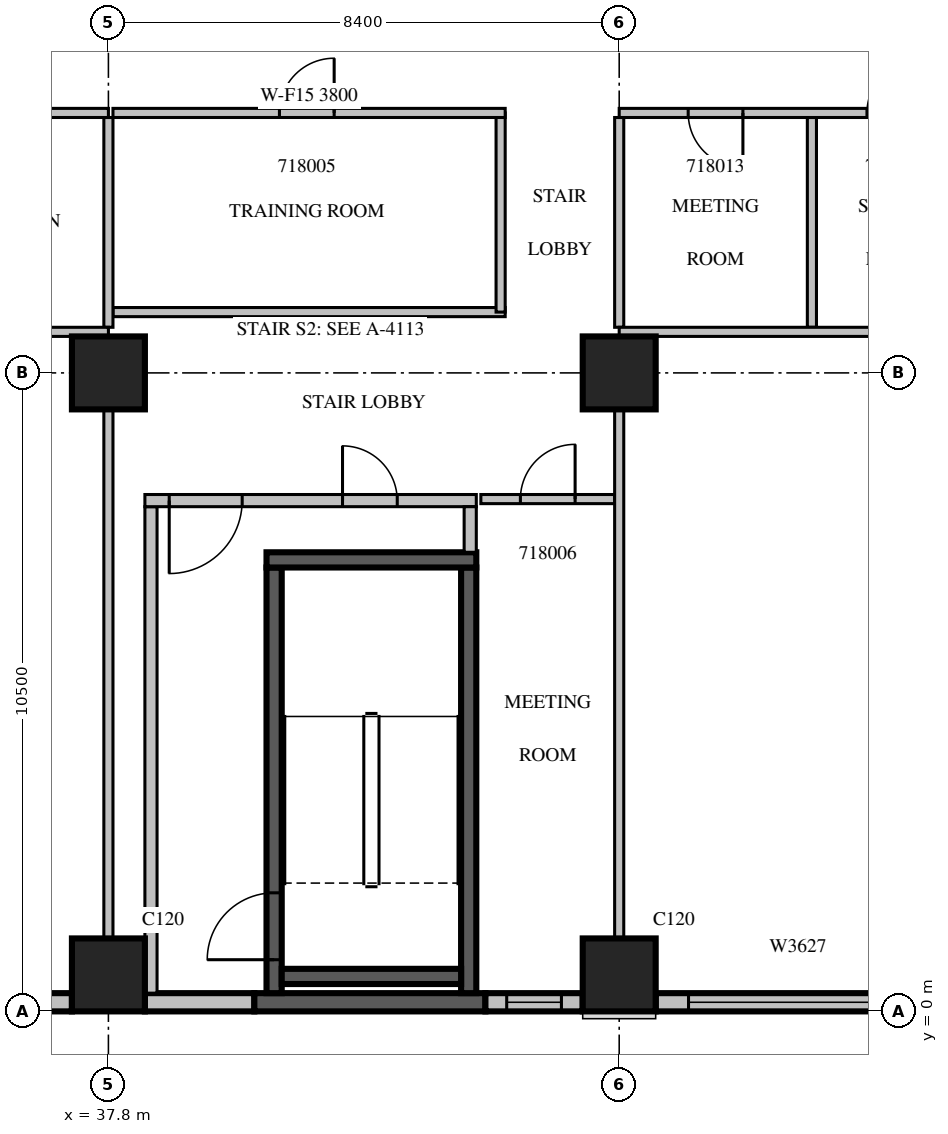
"""IFC4 building model, lengths in metres.
Left out: names, types, materials, properties, quantities, classifications, styles, units other than length and angle.
Written with IfcOpenShell. Run it as: python <this file> out.ifc"""

import sys

from ifc_helpers import new_model, si_unit, direction, frame, frame_2d, origin, origin_2d, place, context, subcontext, project, spatial, rectangle, extrude, source, transform, mapped, element, fill, save


model = new_model("IFC4")
c1 = context("Model", 3, precision=1e-05, world=origin(), true_north=direction((0.0, 1.0)))
c2 = subcontext(c1, "Body", "Model", "MODEL_VIEW")
j1 = project(units=[si_unit("LENGTHUNIT", "METRE"), si_unit("PLANEANGLEUNIT", "RADIAN")], contexts=[c1])
p1 = place(None, origin())
s1 = spatial("IfcSite", under=j1, at=p1, CompositionType="ELEMENT")
p2 = place(p1, origin())
s2 = spatial("IfcBuilding", under=s1, at=p2, CompositionType="ELEMENT")
p3 = place(p2, frame((0.0, 0.0, 86.7)))
s3 = spatial("IfcBuildingStorey", under=s2, at=p3, CompositionType="ELEMENT", Elevation=86.7)
m1 = source(origin(), c2, "Body", "SweptSolid", [
    extrude(rectangle(XDim=1.2, YDim=1.2, at=origin_2d()), origin(), (0.0, 0.0, 1.0), 4.2),
])
for number, where, z_axis, x_axis in (
    (1, (37.8, 0.6, 0.0), (0.0, 0.0, 1.0), (1.0, 0.0, 0.0)),
    (2, (46.2, 0.6, 0.0), (0.0, 0.0, 1.0), (1.0, 0.0, 0.0)),
    (3, (37.8, 10.5, 0.0), (0.0, 0.0, 1.0), (1.0, 0.0, 0.0)),
    (4, (46.2, 10.5, 0.0), (0.0, 0.0, 1.0), (1.0, 0.0, 0.0)),
):
    element("IfcColumn", number, at=place(p3, frame(where, z_axis=z_axis, x_axis=x_axis)), inside=s3, PredefinedType="COLUMN", context=c2, shape_type="MappedRepresentation", body=[
        mapped(m1, transform((0.0, 0.0, 0.0), scale=1.0)),
    ])
m2 = source(origin(), c2, "Body", "SweptSolid", [
    extrude(rectangle(XDim=7.2, YDim=0.3, at=frame_2d((3.6, 0.0))), origin(), (0.0, 0.0, 1.0), 3.8),
])
p4 = place(p3, frame((30.0, 0.15, 0.0), z_axis=(0.0, 0.0, 1.0), x_axis=(1.0, 0.0, 0.0)))
e5 = element("IfcWall", 5, at=p4, inside=s3, PredefinedType="STANDARD", context=c2, shape_type="MappedRepresentation", body=[
    mapped(m2, transform((0.0, 0.0, 0.0), scale=1.0)),
])
m3 = source(origin(), c2, "Body", "SweptSolid", [
    extrude(rectangle(XDim=2.4, YDim=2.7, at=frame_2d((1.2, 1.35))), frame((0.0, 0.16, 0.0), z_axis=(0.0, -1.0, 0.0), x_axis=(1.0, 0.0, 0.0)), (0.0, 0.0, 1.0), 0.32),
])
p5 = place(p4, frame((2.5, 0.0, 0.6)))
e6 = element("IfcOpeningElement", 6, at=p5, cuts=e5, PredefinedType="OPENING", context=c2, shape_type="MappedRepresentation", body=[
    mapped(m3, transform((0.0, 0.0, 0.0), scale=1.0)),
])
m4 = source(origin(), c2, "Body", "SweptSolid", [
    extrude(rectangle(XDim=1.8, YDim=0.3, at=frame_2d((0.9, 0.0))), origin(), (0.0, 0.0, 1.0), 3.8),
])
p6 = place(p3, frame((38.4, 0.15, 0.0), z_axis=(0.0, 0.0, 1.0), x_axis=(1.0, 0.0, 0.0)))
e7 = element("IfcWall", 7, at=p6, inside=s3, PredefinedType="STANDARD", context=c2, shape_type="MappedRepresentation", body=[
    mapped(m4, transform((0.0, 0.0, 0.0), scale=1.0)),
])
m5 = source(origin(), c2, "Body", "SweptSolid", [
    extrude(rectangle(XDim=3.8, YDim=0.3, at=frame_2d((1.9, 0.0))), origin(), (0.0, 0.0, 1.0), 3.8),
])
p7 = place(p3, frame((40.2, 0.15, 0.0), z_axis=(0.0, 0.0, 1.0), x_axis=(1.0, 0.0, 0.0)))
e8 = element("IfcWall", 8, at=p7, inside=s3, PredefinedType="SOLIDWALL", context=c2, shape_type="MappedRepresentation", body=[
    mapped(m5, transform((0.0, 0.0, 0.0), scale=1.0)),
])
m6 = source(origin(), c2, "Body", "SweptSolid", [
    extrude(rectangle(XDim=1.6, YDim=0.3, at=frame_2d((0.8, 0.0))), origin(), (0.0, 0.0, 1.0), 3.8),
])
p8 = place(p3, frame((44.0, 0.15, 0.0), z_axis=(0.0, 0.0, 1.0), x_axis=(1.0, 0.0, 0.0)))
e9 = element("IfcWall", 9, at=p8, inside=s3, PredefinedType="STANDARD", context=c2, shape_type="MappedRepresentation", body=[
    mapped(m6, transform((0.0, 0.0, 0.0), scale=1.0)),
])
m7 = source(origin(), c2, "Body", "SweptSolid", [
    extrude(rectangle(XDim=0.9, YDim=2.7, at=frame_2d((0.45, 1.35))), frame((0.0, 0.16, 0.0), z_axis=(0.0, -1.0, 0.0), x_axis=(1.0, 0.0, 0.0)), (0.0, 0.0, 1.0), 0.32),
])
p9 = place(p8, frame((0.35, 0.0, 0.6)))
e10 = element("IfcOpeningElement", 10, at=p9, cuts=e9, PredefinedType="OPENING", context=c2, shape_type="MappedRepresentation", body=[
    mapped(m7, transform((0.0, 0.0, 0.0), scale=1.0)),
])
m8 = source(origin(), c2, "Body", "SweptSolid", [
    extrude(rectangle(XDim=4.68, YDim=0.3, at=frame_2d((2.34, 0.0))), origin(), (0.0, 0.0, 1.0), 3.8),
])
p10 = place(p3, frame((46.8, 0.15, 0.0), z_axis=(0.0, 0.0, 1.0), x_axis=(1.0, 0.0, 0.0)))
e11 = element("IfcWall", 11, at=p10, inside=s3, PredefinedType="STANDARD", context=c2, shape_type="MappedRepresentation", body=[
    mapped(m8, transform((0.0, 0.0, 0.0), scale=1.0)),
])
m9 = source(origin(), c2, "Body", "SweptSolid", [
    extrude(rectangle(XDim=3.6, YDim=2.7, at=frame_2d((1.8, 1.35))), frame((0.0, 0.16, 0.0), z_axis=(0.0, -1.0, 0.0), x_axis=(1.0, 0.0, 0.0)), (0.0, 0.0, 1.0), 0.32),
])
p11 = place(p10, frame((0.54, 0.0, 0.6)))
e12 = element("IfcOpeningElement", 12, at=p11, cuts=e11, PredefinedType="OPENING", context=c2, shape_type="MappedRepresentation", body=[
    mapped(m9, transform((0.0, 0.0, 0.0), scale=1.0)),
])
m10 = source(origin(), c2, "Body", "SweptSolid", [
    extrude(rectangle(XDim=7.0, YDim=0.25, at=frame_2d((3.5, 0.0))), origin(), (0.0, 0.0, 1.0), 3.8),
])
p12 = place(p3, frame((40.525, 0.3, 0.0), z_axis=(0.0, 0.0, 1.0), x_axis=(0.0, 1.0, 0.0)))
e13 = element("IfcWall", 13, at=p12, inside=s3, PredefinedType="SOLIDWALL", context=c2, shape_type="MappedRepresentation", body=[
    mapped(m10, transform((0.0, 0.0, 0.0), scale=1.0)),
])
m11 = source(origin(), c2, "Body", "SweptSolid", [
    extrude(rectangle(XDim=1.1, YDim=2.1, at=frame_2d((0.55, 1.05))), frame((0.0, 0.135, 0.0), z_axis=(0.0, -1.0, 0.0), x_axis=(1.0, 0.0, 0.0)), (0.0, 0.0, 1.0), 0.27),
])
p13 = place(p12, frame((0.55, 0.0, 0.0)))
e14 = element("IfcOpeningElement", 14, at=p13, cuts=e13, PredefinedType="OPENING", context=c2, shape_type="MappedRepresentation", body=[
    mapped(m11, transform((0.0, 0.0, 0.0), scale=1.0)),
])
p14 = place(p3, frame((43.725, 0.3, 0.0), z_axis=(0.0, 0.0, 1.0), x_axis=(0.0, 1.0, 0.0)))
e15 = element("IfcWall", 15, at=p14, inside=s3, PredefinedType="SOLIDWALL", context=c2, shape_type="MappedRepresentation", body=[
    mapped(m10, transform((0.0, 0.0, 0.0), scale=1.0)),
])
m12 = source(origin(), c2, "Body", "SweptSolid", [
    extrude(rectangle(XDim=3.45, YDim=0.25, at=frame_2d((1.725, 0.0))), origin(), (0.0, 0.0, 1.0), 3.8),
])
p15 = place(p3, frame((40.4, 7.425, 0.0), z_axis=(0.0, 0.0, 1.0), x_axis=(1.0, 0.0, 0.0)))
e16 = element("IfcWall", 16, at=p15, inside=s3, PredefinedType="SOLIDWALL", context=c2, shape_type="MappedRepresentation", body=[
    mapped(m12, transform((0.0, 0.0, 0.0), scale=1.0)),
])
m13 = source(origin(), c2, "Body", "SweptSolid", [
    extrude(rectangle(XDim=2.95, YDim=0.25, at=frame_2d((1.475, 0.0))), origin(), (0.0, 0.0, 1.0), 3.8),
])
p16 = place(p3, frame((40.65, 0.575, 0.0), z_axis=(0.0, 0.0, 1.0), x_axis=(1.0, 0.0, 0.0)))
e17 = element("IfcWall", 17, at=p16, inside=s3, PredefinedType="SOLIDWALL", context=c2, shape_type="MappedRepresentation", body=[
    mapped(m13, transform((0.0, 0.0, 0.0), scale=1.0)),
])
m14 = source(origin(), c2, "Body", "SweptSolid", [
    extrude(rectangle(XDim=8.0, YDim=0.2, at=frame_2d((4.0, 0.0))), origin(), (0.0, 0.0, 1.0), 3.8),
])
p17 = place(p3, frame((38.5, 0.3, 0.0), z_axis=(0.0, 0.0, 1.0), x_axis=(0.0, 1.0, 0.0)))
e18 = element("IfcWall", 18, at=p17, inside=s3, PredefinedType="PARTITIONING", context=c2, shape_type="MappedRepresentation", body=[
    mapped(m14, transform((0.0, 0.0, 0.0), scale=1.0)),
])
m15 = source(origin(), c2, "Body", "SweptSolid", [
    extrude(rectangle(XDim=5.45, YDim=0.2, at=frame_2d((2.725, 0.0))), origin(), (0.0, 0.0, 1.0), 3.8),
])
p18 = place(p3, frame((38.4, 8.4, 0.0), z_axis=(0.0, 0.0, 1.0), x_axis=(1.0, 0.0, 0.0)))
e19 = element("IfcWall", 19, at=p18, inside=s3, PredefinedType="PARTITIONING", context=c2, shape_type="MappedRepresentation", body=[
    mapped(m15, transform((0.0, 0.0, 0.0), scale=1.0)),
])
m16 = source(origin(), c2, "Body", "SweptSolid", [
    extrude(rectangle(XDim=1.2, YDim=2.1, at=frame_2d((0.6, 1.05))), frame((0.0, 0.11, 0.0), z_axis=(0.0, -1.0, 0.0), x_axis=(1.0, 0.0, 0.0)), (0.0, 0.0, 1.0), 0.22),
])
p19 = place(p18, frame((0.4, 0.0, 0.0)))
e20 = element("IfcOpeningElement", 20, at=p19, cuts=e19, PredefinedType="OPENING", context=c2, shape_type="MappedRepresentation", body=[
    mapped(m16, transform((0.0, 0.0, 0.0), scale=1.0)),
])
m17 = source(origin(), c2, "Body", "SweptSolid", [
    extrude(rectangle(XDim=0.9, YDim=2.1, at=frame_2d((0.45, 1.05))), frame((0.0, 0.11, 0.0), z_axis=(0.0, -1.0, 0.0), x_axis=(1.0, 0.0, 0.0)), (0.0, 0.0, 1.0), 0.22),
])
p20 = place(p18, frame((3.25, 0.0, 0.0)))
e21 = element("IfcOpeningElement", 21, at=p20, cuts=e19, PredefinedType="OPENING", context=c2, shape_type="MappedRepresentation", body=[
    mapped(m17, transform((0.0, 0.0, 0.0), scale=1.0)),
])
m18 = source(origin(), c2, "Body", "SweptSolid", [
    extrude(rectangle(XDim=0.75, YDim=0.2, at=frame_2d((0.375, 0.0))), origin(), (0.0, 0.0, 1.0), 3.8),
])
p21 = place(p3, frame((43.75, 7.55, 0.0), z_axis=(0.0, 0.0, 1.0), x_axis=(0.0, 1.0, 0.0)))
e22 = element("IfcWall", 22, at=p21, inside=s3, PredefinedType="PARTITIONING", context=c2, shape_type="MappedRepresentation", body=[
    mapped(m18, transform((0.0, 0.0, 0.0), scale=1.0)),
])
m19 = source(origin(), c2, "Body", "SweptSolid", [
    extrude(rectangle(XDim=6.45, YDim=0.15, at=frame_2d((3.225, 0.0))), origin(), (0.0, 0.0, 1.0), 3.8),
])
p22 = place(p3, frame((37.875, 11.5, 0.0), z_axis=(0.0, 0.0, 1.0), x_axis=(1.0, 0.0, 0.0)))
e23 = element("IfcWall", 23, at=p22, inside=s3, PredefinedType="PARTITIONING", context=c2, shape_type="MappedRepresentation", body=[
    mapped(m19, transform((0.0, 0.0, 0.0), scale=1.0)),
])
m20 = source(origin(), c2, "Body", "SweptSolid", [
    extrude(rectangle(XDim=3.275, YDim=0.15, at=frame_2d((1.637, 0.0))), origin(), (0.0, 0.0, 1.0), 3.8),
])
p23 = place(p3, frame((44.25, 11.5, 0.0), z_axis=(0.0, 0.0, 1.0), x_axis=(0.0, 1.0, 0.0)))
e24 = element("IfcWall", 24, at=p23, inside=s3, PredefinedType="PARTITIONING", context=c2, shape_type="MappedRepresentation", body=[
    mapped(m20, transform((0.0, 0.0, 0.0), scale=1.0)),
])
p24 = place(p3, frame((44.325, 14.775, 0.0), z_axis=(0.0, 0.0, 1.0), x_axis=(-1.0, 0.0, 0.0)))
e25 = element("IfcWall", 25, at=p24, inside=s3, PredefinedType="PARTITIONING", context=c2, shape_type="MappedRepresentation", body=[
    mapped(m19, transform((0.0, 0.0, 0.0), scale=1.0)),
])
m21 = source(origin(), c2, "Body", "SweptSolid", [
    extrude(rectangle(XDim=0.9, YDim=2.1, at=frame_2d((0.45, 1.05))), frame((0.0, 0.085, 0.0), z_axis=(0.0, -1.0, 0.0), x_axis=(1.0, 0.0, 0.0)), (0.0, 0.0, 1.0), 0.17),
])
p25 = place(p24, frame((2.812, 0.0, 0.0)))
e26 = element("IfcOpeningElement", 26, at=p25, cuts=e25, PredefinedType="OPENING", context=c2, shape_type="MappedRepresentation", body=[
    mapped(m21, transform((0.0, 0.0, 0.0), scale=1.0)),
])
m22 = source(origin(), c2, "Body", "SweptSolid", [
    extrude(rectangle(XDim=2.2, YDim=0.15, at=frame_2d((1.1, 0.0))), origin(), (0.0, 0.0, 1.0), 3.8),
])
p26 = place(p3, frame((46.125, 8.425, 0.0), z_axis=(0.0, 0.0, 1.0), x_axis=(-1.0, 0.0, 0.0)))
e27 = element("IfcWall", 27, at=p26, inside=s3, PredefinedType="PARTITIONING", context=c2, shape_type="MappedRepresentation", body=[
    mapped(m22, transform((0.0, 0.0, 0.0), scale=1.0)),
])
p27 = place(p26, frame((0.65, 0.0, 0.0)))
e28 = element("IfcOpeningElement", 28, at=p27, cuts=e27, PredefinedType="OPENING", context=c2, shape_type="MappedRepresentation", body=[
    mapped(m21, transform((0.0, 0.0, 0.0), scale=1.0)),
])
m23 = source(origin(), c2, "Body", "SweptSolid", [
    extrude(rectangle(XDim=8.702, YDim=0.15, at=frame_2d((4.351, 0.0))), origin(), (0.0, 0.0, 1.0), 3.8),
])
p28 = place(p3, frame((37.8, 1.199, 0.0), z_axis=(0.0, 0.0, 1.0), x_axis=(0.0, 1.0, 0.0)))
e29 = element("IfcWall", 29, at=p28, inside=s3, PredefinedType="PARTITIONING", context=c2, shape_type="MappedRepresentation", body=[
    mapped(m23, transform((0.0, 0.0, 0.0), scale=1.0)),
])
m24 = source(origin(), c2, "Body", "SweptSolid", [
    extrude(rectangle(XDim=3.45, YDim=0.15, at=frame_2d((1.725, 0.0))), origin(), (0.0, 0.0, 1.0), 3.8),
])
p29 = place(p3, frame((37.8, 11.25, 0.0), z_axis=(0.0, 0.0, 1.0), x_axis=(0.0, 1.0, 0.0)))
e30 = element("IfcWall", 30, at=p29, inside=s3, PredefinedType="PARTITIONING", context=c2, shape_type="MappedRepresentation", body=[
    mapped(m24, transform((0.0, 0.0, 0.0), scale=1.0)),
])
m25 = source(origin(), c2, "Body", "SweptSolid", [
    extrude(rectangle(XDim=8.4, YDim=0.15, at=frame_2d((4.2, 0.0))), origin(), (0.0, 0.0, 1.0), 3.3),
])
p30 = place(p3, frame((37.8, 11.175, 0.0), z_axis=(0.0, 0.0, 1.0), x_axis=(-1.0, 0.0, 0.0)))
e31 = element("IfcWall", 31, at=p30, inside=s3, PredefinedType="PARTITIONING", context=c2, shape_type="MappedRepresentation", body=[
    mapped(m25, transform((0.0, 0.0, 0.0), scale=1.0)),
])
m26 = source(origin(), c2, "Body", "SweptSolid", [
    extrude(rectangle(XDim=1.1, YDim=2.1, at=frame_2d((0.55, 1.05))), frame((0.0, 0.085, 0.0), z_axis=(0.0, -1.0, 0.0), x_axis=(1.0, 0.0, 0.0)), (0.0, 0.0, 1.0), 0.17),
])
p31 = place(p30, frame((1.379, 0.0, 0.0)))
e32 = element("IfcOpeningElement", 32, at=p31, cuts=e31, PredefinedType="OPENING", context=c2, shape_type="MappedRepresentation", body=[
    mapped(m26, transform((0.0, 0.0, 0.0), scale=1.0)),
])
p32 = place(p3, frame((49.369, 11.25, 0.0), z_axis=(0.0, 0.0, 1.0), x_axis=(0.0, 1.0, 0.0)))
e33 = element("IfcWall", 33, at=p32, inside=s3, PredefinedType="PARTITIONING", context=c2, shape_type="MappedRepresentation", body=[
    mapped(m24, transform((0.0, 0.0, 0.0), scale=1.0)),
])
p33 = place(p3, frame((46.2, 1.199, 0.0), z_axis=(0.0, 0.0, 1.0), x_axis=(0.0, 1.0, 0.0)))
e34 = element("IfcWall", 34, at=p33, inside=s3, PredefinedType="PARTITIONING", context=c2, shape_type="MappedRepresentation", body=[
    mapped(m23, transform((0.0, 0.0, 0.0), scale=1.0)),
])
p34 = place(p3, frame((46.2, 11.25, 0.0), z_axis=(0.0, 0.0, 1.0), x_axis=(0.0, 1.0, 0.0)))
e35 = element("IfcWall", 35, at=p34, inside=s3, PredefinedType="PARTITIONING", context=c2, shape_type="MappedRepresentation", body=[
    mapped(m24, transform((0.0, 0.0, 0.0), scale=1.0)),
])
m27 = source(origin(), c2, "Body", "SweptSolid", [
    extrude(rectangle(XDim=24.9, YDim=0.15, at=frame_2d((12.45, 0.0))), origin(), (0.0, 0.0, 1.0), 3.3),
])
p35 = place(p3, frame((71.1, 11.175, 0.0), z_axis=(0.0, 0.0, 1.0), x_axis=(-1.0, 0.0, 0.0)))
e36 = element("IfcWall", 36, at=p35, inside=s3, PredefinedType="PARTITIONING", context=c2, shape_type="MappedRepresentation", body=[
    mapped(m27, transform((0.0, 0.0, 0.0), scale=1.0)),
])
p36 = place(p35, frame((4.508, 0.0, 0.0)))
e37 = element("IfcOpeningElement", 37, at=p36, cuts=e36, PredefinedType="OPENING", context=c2, shape_type="MappedRepresentation", body=[
    mapped(m26, transform((0.0, 0.0, 0.0), scale=1.0)),
])
p37 = place(p35, frame((2.243, 0.0, 0.0)))
e38 = element("IfcOpeningElement", 38, at=p37, cuts=e36, PredefinedType="OPENING", context=c2, shape_type="MappedRepresentation", body=[
    mapped(m21, transform((0.0, 0.0, 0.0), scale=1.0)),
])
p38 = place(p3, frame((37.8, 14.775, 0.0), z_axis=(0.0, 0.0, 1.0), x_axis=(-1.0, 0.0, 0.0)))
e39 = element("IfcWall", 39, at=p38, inside=s3, PredefinedType="PARTITIONING", context=c2, shape_type="MappedRepresentation", body=[
    mapped(m25, transform((0.0, 0.0, 0.0), scale=1.0)),
])
p39 = place(p38, frame((1.115, 0.0, 0.0)))
e40 = element("IfcOpeningElement", 40, at=p39, cuts=e39, PredefinedType="OPENING", context=c2, shape_type="MappedRepresentation", body=[
    mapped(m26, transform((0.0, 0.0, 0.0), scale=1.0)),
])
p40 = place(p38, frame((6.818, 0.0, 0.0)))
e41 = element("IfcOpeningElement", 41, at=p40, cuts=e39, PredefinedType="OPENING", context=c2, shape_type="MappedRepresentation", body=[
    mapped(m21, transform((0.0, 0.0, 0.0), scale=1.0)),
])
p41 = place(p38, frame((4.282, 0.0, 0.0)))
e42 = element("IfcOpeningElement", 42, at=p41, cuts=e39, PredefinedType="OPENING", context=c2, shape_type="MappedRepresentation", body=[
    mapped(m21, transform((0.0, 0.0, 0.0), scale=1.0)),
])
p42 = place(p3, frame((71.1, 14.775, 0.0), z_axis=(0.0, 0.0, 1.0), x_axis=(-1.0, 0.0, 0.0)))
e43 = element("IfcWall", 43, at=p42, inside=s3, PredefinedType="PARTITIONING", context=c2, shape_type="MappedRepresentation", body=[
    mapped(m27, transform((0.0, 0.0, 0.0), scale=1.0)),
])
p43 = place(p42, frame((4.82, 0.0, 0.0)))
e44 = element("IfcOpeningElement", 44, at=p43, cuts=e43, PredefinedType="OPENING", context=c2, shape_type="MappedRepresentation", body=[
    mapped(m26, transform((0.0, 0.0, 0.0), scale=1.0)),
])
p44 = place(p42, frame((22.866, 0.0, 0.0)))
e45 = element("IfcOpeningElement", 45, at=p44, cuts=e43, PredefinedType="OPENING", context=c2, shape_type="MappedRepresentation", body=[
    mapped(m21, transform((0.0, 0.0, 0.0), scale=1.0)),
])
p45 = place(p42, frame((19.925, 0.0, 0.0)))
e46 = element("IfcOpeningElement", 46, at=p45, cuts=e43, PredefinedType="OPENING", context=c2, shape_type="MappedRepresentation", body=[
    mapped(m21, transform((0.0, 0.0, 0.0), scale=1.0)),
])
p46 = place(p42, frame((15.63, 0.0, 0.0)))
e47 = element("IfcOpeningElement", 47, at=p46, cuts=e43, PredefinedType="OPENING", context=c2, shape_type="MappedRepresentation", body=[
    mapped(m21, transform((0.0, 0.0, 0.0), scale=1.0)),
])
p47 = place(p42, frame((9.75, 0.0, 0.0)))
e48 = element("IfcOpeningElement", 48, at=p47, cuts=e43, PredefinedType="OPENING", context=c2, shape_type="MappedRepresentation", body=[
    mapped(m21, transform((0.0, 0.0, 0.0), scale=1.0)),
])
m28 = source(origin(), c2, "Body", "SweptSolid", [
    extrude(rectangle(XDim=1.2, YDim=2.1, at=frame_2d((0.6, 1.05))), frame((0.0, 0.085, 0.0), z_axis=(0.0, -1.0, 0.0), x_axis=(1.0, 0.0, 0.0)), (0.0, 0.0, 1.0), 0.17),
])
p48 = place(p42, frame((1.103, 0.0, 0.0)))
e49 = element("IfcOpeningElement", 49, at=p48, cuts=e43, PredefinedType="OPENING", context=c2, shape_type="MappedRepresentation", body=[
    mapped(m28, transform((0.0, 0.0, 0.0), scale=1.0)),
])
m29 = source(origin(), c2, "Body", "SweptSolid", [
    extrude(rectangle(XDim=0.9, YDim=2.7, at=frame_2d((0.45, 1.35))), frame((0.0, 0.03, 0.0), z_axis=(0.0, -1.0, 0.0), x_axis=(1.0, 0.0, 0.0)), (0.0, 0.0, 1.0), 0.06),
])
p49 = place(p9, origin())
e50 = element("IfcWindow", 50, at=p49, inside=s3, PartitioningType="SINGLE_PANEL", PredefinedType="WINDOW", context=c2, shape_type="MappedRepresentation", body=[
    mapped(m29, transform((0.0, 0.0, 0.0), scale=1.0)),
])
fill(e10, e50)
m30 = source(origin(), c2, "Body", "SweptSolid", [
    extrude(rectangle(XDim=3.6, YDim=2.7, at=frame_2d((1.8, 1.35))), frame((0.0, 0.03, 0.0), z_axis=(0.0, -1.0, 0.0), x_axis=(1.0, 0.0, 0.0)), (0.0, 0.0, 1.0), 0.06),
])
p50 = place(p11, origin())
e51 = element("IfcWindow", 51, at=p50, inside=s3, PartitioningType="SINGLE_PANEL", PredefinedType="WINDOW", context=c2, shape_type="MappedRepresentation", body=[
    mapped(m30, transform((0.0, 0.0, 0.0), scale=1.0)),
])
fill(e12, e51)
m31 = source(origin(), c2, "Body", "SweptSolid", [
    extrude(rectangle(XDim=1.1, YDim=2.1, at=frame_2d((0.55, 1.05))), frame((0.0, 0.025, 0.0), z_axis=(0.0, -1.0, 0.0), x_axis=(1.0, 0.0, 0.0)), (0.0, 0.0, 1.0), 0.05),
])
p51 = place(p13, origin())
e52 = element("IfcDoor", 52, at=p51, inside=s3, OperationType="SINGLE_SWING_LEFT", PredefinedType="DOOR", context=c2, shape_type="MappedRepresentation", body=[
    mapped(m31, transform((0.0, 0.0, 0.0), scale=1.0)),
])
fill(e14, e52)
m32 = source(origin(), c2, "Body", "SweptSolid", [
    extrude(rectangle(XDim=1.2, YDim=2.1, at=frame_2d((0.6, 1.05))), frame((0.0, 0.025, 0.0), z_axis=(0.0, -1.0, 0.0), x_axis=(1.0, 0.0, 0.0)), (0.0, 0.0, 1.0), 0.05),
])
p52 = place(p19, origin())
e53 = element("IfcDoor", 53, at=p52, inside=s3, OperationType="SINGLE_SWING_RIGHT", PredefinedType="DOOR", context=c2, shape_type="MappedRepresentation", body=[
    mapped(m32, transform((0.0, 0.0, 0.0), scale=1.0)),
])
fill(e20, e53)
m33 = source(origin(), c2, "Body", "SweptSolid", [
    extrude(rectangle(XDim=0.9, YDim=2.1, at=frame_2d((0.45, 1.05))), frame((0.0, 0.025, 0.0), z_axis=(0.0, -1.0, 0.0), x_axis=(1.0, 0.0, 0.0)), (0.0, 0.0, 1.0), 0.05),
])
p53 = place(p20, origin())
e54 = element("IfcDoor", 54, at=p53, inside=s3, OperationType="SINGLE_SWING_LEFT", PredefinedType="DOOR", context=c2, shape_type="MappedRepresentation", body=[
    mapped(m33, transform((0.0, 0.0, 0.0), scale=1.0)),
])
fill(e21, e54)
p54 = place(p25, origin())
e55 = element("IfcDoor", 55, at=p54, inside=s3, OperationType="SINGLE_SWING_RIGHT", PredefinedType="DOOR", context=c2, shape_type="MappedRepresentation", body=[
    mapped(m33, transform((0.0, 0.0, 0.0), scale=1.0)),
])
fill(e26, e55)
p55 = place(p27, origin())
e56 = element("IfcDoor", 56, at=p55, inside=s3, OperationType="SINGLE_SWING_RIGHT", PredefinedType="DOOR", context=c2, shape_type="MappedRepresentation", body=[
    mapped(m33, transform((0.0, 0.0, 0.0), scale=1.0)),
])
fill(e28, e56)
p56 = place(p44, origin())
e57 = element("IfcDoor", 57, at=p56, inside=s3, OperationType="SINGLE_SWING_LEFT", PredefinedType="DOOR", context=c2, shape_type="MappedRepresentation", body=[
    mapped(m33, transform((0.0, 0.0, 0.0), scale=1.0)),
])
fill(e45, e57)
p57 = place(p45, origin())
e58 = element("IfcDoor", 58, at=p57, inside=s3, OperationType="SINGLE_SWING_RIGHT", PredefinedType="DOOR", context=c2, shape_type="MappedRepresentation", body=[
    mapped(m33, transform((0.0, 0.0, 0.0), scale=1.0)),
])
fill(e46, e58)
save(model, sys.argv[1])
